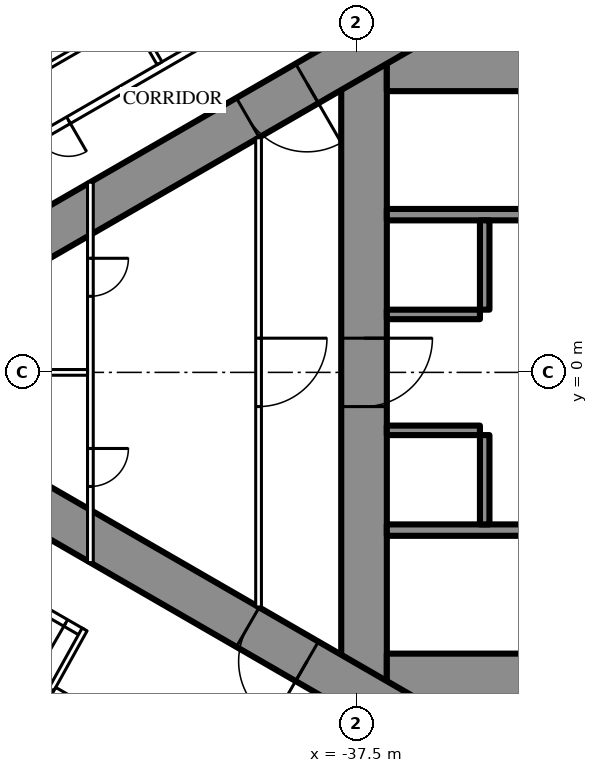
"""IFC4 building model, lengths in metres.
Left out: names, types, materials, properties, quantities, classifications, styles, units other than length and angle.
Written with IfcOpenShell. Run it as: python <this file> out.ifc"""

import sys

from ifc_helpers import new_model, si_unit, direction, frame, frame_2d, origin, place, context, subcontext, project, spatial, rectangle, extrude, element, fill, save


model = new_model("IFC4")
c1 = context("Model", 3, precision=1e-05, world=origin(), true_north=direction((0.0, 1.0)))
c2 = subcontext(c1, "Body", "Model", "MODEL_VIEW")
j1 = project(units=[si_unit("LENGTHUNIT", "METRE"), si_unit("PLANEANGLEUNIT", "RADIAN")], contexts=[c1])
p1 = place(None, origin())
s1 = spatial("IfcSite", under=j1, at=p1, CompositionType="ELEMENT")
p2 = place(p1, origin())
s2 = spatial("IfcBuilding", under=s1, at=p2, CompositionType="ELEMENT")
p3 = place(p2, frame((0.0, 0.0, 244.1)))
s3 = spatial("IfcBuildingStorey", under=s2, at=p3, CompositionType="ELEMENT", Elevation=244.1)
p4 = place(p3, frame((-37.3, 8.6, 0.0), z_axis=(0.0, 0.0, 1.0), x_axis=(0.0, -1.0, 0.0)))
e1 = element("IfcWall", 1, at=p4, inside=s3, PredefinedType="SHEAR", context=c2, shape_type="SweptSolid", body=[
    extrude(rectangle(XDim=17.2, YDim=1.2, at=frame_2d((8.6, 0.0))), origin(), (0.0, 0.0, 1.0), 3.6),
])
p5 = place(p4, frame((7.7, 0.0, 0.0)))
e2 = element("IfcOpeningElement", 2, at=p5, cuts=e1, PredefinedType="OPENING", context=c2, shape_type="SweptSolid", body=[
    extrude(rectangle(XDim=1.8, YDim=2.2, at=frame_2d((0.9, 1.1))), frame((0.0, 0.61, 0.0), z_axis=(0.0, -1.0, 0.0), x_axis=(1.0, 0.0, 0.0)), (0.0, 0.0, 1.0), 1.22),
])
p6 = place(p3, frame((-28.3, 8.0, 0.0), z_axis=(0.0, 0.0, 1.0), x_axis=(-1.0, 0.0, 0.0)))
e3 = element("IfcWall", 3, at=p6, inside=s3, PredefinedType="SHEAR", context=c2, shape_type="SweptSolid", body=[
    extrude(rectangle(XDim=8.4, YDim=1.2, at=frame_2d((4.2, 0.0))), origin(), (0.0, 0.0, 1.0), 3.6),
])
p7 = place(p6, frame((0.25, 0.0, 0.0)))
e4 = element("IfcOpeningElement", 4, at=p7, cuts=e3, PredefinedType="OPENING", context=c2, shape_type="SweptSolid", body=[
    extrude(rectangle(XDim=1.0, YDim=2.2, at=frame_2d((0.5, 1.1))), frame((0.0, 0.61, 0.0), z_axis=(0.0, -1.0, 0.0), x_axis=(1.0, 0.0, 0.0)), (0.0, 0.0, 1.0), 1.22),
])
p8 = place(p3, frame((-28.3, -8.0, 0.0), z_axis=(0.0, 0.0, 1.0), x_axis=(-1.0, 0.0, 0.0)))
e5 = element("IfcWall", 5, at=p8, inside=s3, PredefinedType="SHEAR", context=c2, shape_type="SweptSolid", body=[
    extrude(rectangle(XDim=8.4, YDim=1.2, at=frame_2d((4.2, 0.0))), origin(), (0.0, 0.0, 1.0), 3.6),
])
p9 = place(p8, frame((0.25, 0.0, 0.0)))
e6 = element("IfcOpeningElement", 6, at=p9, cuts=e5, PredefinedType="OPENING", context=c2, shape_type="SweptSolid", body=[
    extrude(rectangle(XDim=1.0, YDim=2.2, at=frame_2d((0.5, 1.1))), frame((0.0, 0.61, 0.0), z_axis=(0.0, -1.0, 0.0), x_axis=(1.0, 0.0, 0.0)), (0.0, 0.0, 1.0), 1.22),
])
for number, where, z_axis, x_axis in (
    (7, (-28.3, 4.15, 0.0), (0.0, 0.0, 1.0), (-1.0, 0.0, 0.0)),
    (8, (-28.3, -4.15, 0.0), (0.0, 0.0, 1.0), (-1.0, 0.0, 0.0)),
):
    element("IfcWall", number, at=place(p3, frame(where, z_axis=z_axis, x_axis=x_axis)), inside=s3, PredefinedType="SHEAR", context=c2, shape_type="SweptSolid", body=[
        extrude(rectangle(XDim=8.4, YDim=0.3, at=frame_2d((4.2, 0.0))), origin(), (0.0, 0.0, 1.0), 3.6),
    ])
p10 = place(p3, frame((-34.125, 4.0, 0.0), z_axis=(0.0, 0.0, 1.0), x_axis=(0.0, -1.0, 0.0)))
e9 = element("IfcWall", 9, at=p10, inside=s3, PredefinedType="SHEAR", context=c2, shape_type="SweptSolid", body=[
    extrude(rectangle(XDim=2.35, YDim=0.25, at=frame_2d((1.175, 0.0))), origin(), (0.0, 0.0, 1.0), 3.6),
])
p11 = place(p3, frame((-34.25, 1.525, 0.0), z_axis=(0.0, 0.0, 1.0), x_axis=(-1.0, 0.0, 0.0)))
e10 = element("IfcWall", 10, at=p11, inside=s3, PredefinedType="SHEAR", context=c2, shape_type="SweptSolid", body=[
    extrude(rectangle(XDim=2.45, YDim=0.25, at=frame_2d((1.225, 0.0))), origin(), (0.0, 0.0, 1.0), 3.6),
])
p12 = place(p3, frame((-34.125, -1.65, 0.0), z_axis=(0.0, 0.0, 1.0), x_axis=(0.0, -1.0, 0.0)))
e11 = element("IfcWall", 11, at=p12, inside=s3, PredefinedType="SHEAR", context=c2, shape_type="SweptSolid", body=[
    extrude(rectangle(XDim=2.35, YDim=0.25, at=frame_2d((1.175, 0.0))), origin(), (0.0, 0.0, 1.0), 3.6),
])
p13 = place(p3, frame((-34.25, -1.525, 0.0), z_axis=(0.0, 0.0, 1.0), x_axis=(-1.0, 0.0, 0.0)))
e12 = element("IfcWall", 12, at=p13, inside=s3, PredefinedType="SHEAR", context=c2, shape_type="SweptSolid", body=[
    extrude(rectangle(XDim=2.45, YDim=0.25, at=frame_2d((1.225, 0.0))), origin(), (0.0, 0.0, 1.0), 3.6),
])
p14 = place(p3, frame((-27.2, 14.3, 0.0), z_axis=(0.0, 0.0, 1.0), x_axis=(-0.866026593062, -0.499997940104, 0.0)))
e13 = element("IfcWall", 13, at=p14, inside=s3, PredefinedType="SHEAR", context=c2, shape_type="SweptSolid", body=[
    extrude(rectangle(XDim=28.946, YDim=1.2, at=frame_2d((14.473, 0.0))), origin(), (0.0, 0.0, 1.0), 3.6),
])
p15 = place(p14, frame((4.6, 0.0, 0.0)))
e14 = element("IfcOpeningElement", 14, at=p15, cuts=e13, PredefinedType="OPENING", context=c2, shape_type="SweptSolid", body=[
    extrude(rectangle(XDim=1.0, YDim=2.2, at=frame_2d((0.5, 1.1))), frame((0.0, 0.61, 0.0), z_axis=(0.0, -1.0, 0.0), x_axis=(1.0, 0.0, 0.0)), (0.0, 0.0, 1.0), 1.22),
])
p16 = place(p14, frame((13.395, 0.0, 0.0)))
e15 = element("IfcOpeningElement", 15, at=p16, cuts=e13, PredefinedType="OPENING", context=c2, shape_type="SweptSolid", body=[
    extrude(rectangle(XDim=1.8, YDim=2.2, at=frame_2d((0.9, 1.1))), frame((0.0, 0.61, 0.0), z_axis=(0.0, -1.0, 0.0), x_axis=(1.0, 0.0, 0.0)), (0.0, 0.0, 1.0), 1.22),
])
p17 = place(p3, frame((-27.2, -14.3, 0.0), z_axis=(0.0, 0.0, 1.0), x_axis=(-0.866024021859, 0.500002393557, 0.0)))
e16 = element("IfcWall", 16, at=p17, inside=s3, PredefinedType="SHEAR", context=c2, shape_type="SweptSolid", body=[
    extrude(rectangle(XDim=27.907, YDim=1.2, at=frame_2d((13.954, 0.0))), origin(), (0.0, 0.0, 1.0), 3.6),
])
p18 = place(p17, frame((4.6, 0.0, 0.0)))
e17 = element("IfcOpeningElement", 17, at=p18, cuts=e16, PredefinedType="OPENING", context=c2, shape_type="SweptSolid", body=[
    extrude(rectangle(XDim=1.0, YDim=2.2, at=frame_2d((0.5, 1.1))), frame((0.0, 0.61, 0.0), z_axis=(0.0, -1.0, 0.0), x_axis=(1.0, 0.0, 0.0)), (0.0, 0.0, 1.0), 1.22),
])
p19 = place(p17, frame((13.395, 0.0, 0.0)))
e18 = element("IfcOpeningElement", 18, at=p19, cuts=e16, PredefinedType="OPENING", context=c2, shape_type="SweptSolid", body=[
    extrude(rectangle(XDim=1.8, YDim=2.2, at=frame_2d((0.9, 1.1))), frame((0.0, 0.61, 0.0), z_axis=(0.0, -1.0, 0.0), x_axis=(1.0, 0.0, 0.0)), (0.0, 0.0, 1.0), 1.22),
])
p20 = place(p3, frame((-28.737, 16.068, 0.0), z_axis=(0.0, 0.0, 1.0), x_axis=(-0.866026057212, -0.499998868229, 0.0)))
e19 = element("IfcWall", 19, at=p20, inside=s3, PredefinedType="PARTITIONING", context=c2, shape_type="SweptSolid", body=[
    extrude(rectangle(XDim=32.137, YDim=0.2, at=frame_2d((16.068, 0.0))), origin(), (0.0, 0.0, 1.0), 3.35),
])
p21 = place(p20, frame((1.08, 0.0, 0.0)))
e20 = element("IfcOpeningElement", 20, at=p21, cuts=e19, PredefinedType="OPENING", context=c2, shape_type="SweptSolid", body=[
    extrude(rectangle(XDim=1.8, YDim=2.04, at=frame_2d((0.9, 1.02))), frame((0.0, 0.11, 0.0), z_axis=(0.0, -1.0, 0.0), x_axis=(1.0, 0.0, 0.0)), (0.0, 0.0, 1.0), 0.22),
])
p22 = place(p20, frame((6.86, 0.0, 0.0)))
e21 = element("IfcOpeningElement", 21, at=p22, cuts=e19, PredefinedType="OPENING", context=c2, shape_type="SweptSolid", body=[
    extrude(rectangle(XDim=1.0, YDim=2.2, at=frame_2d((0.5, 1.1))), frame((0.0, 0.11, 0.0), z_axis=(0.0, -1.0, 0.0), x_axis=(1.0, 0.0, 0.0)), (0.0, 0.0, 1.0), 0.22),
])
p23 = place(p20, frame((18.867, 0.0, 0.0)))
e22 = element("IfcOpeningElement", 22, at=p23, cuts=e19, PredefinedType="OPENING", context=c2, shape_type="SweptSolid", body=[
    extrude(rectangle(XDim=0.95, YDim=2.2, at=frame_2d((0.475, 1.1))), frame((0.0, 0.11, 0.0), z_axis=(0.0, -1.0, 0.0), x_axis=(1.0, 0.0, 0.0)), (0.0, 0.0, 1.0), 0.22),
])
p24 = place(p20, frame((23.015, 0.0, 0.0)))
e23 = element("IfcOpeningElement", 23, at=p24, cuts=e19, PredefinedType="OPENING", context=c2, shape_type="SweptSolid", body=[
    extrude(rectangle(XDim=0.95, YDim=2.2, at=frame_2d((0.475, 1.1))), frame((0.0, 0.11, 0.0), z_axis=(0.0, -1.0, 0.0), x_axis=(1.0, 0.0, 0.0)), (0.0, 0.0, 1.0), 0.22),
])
p25 = place(p20, frame((27.226, 0.0, 0.0)))
e24 = element("IfcOpeningElement", 24, at=p25, cuts=e19, PredefinedType="OPENING", context=c2, shape_type="SweptSolid", body=[
    extrude(rectangle(XDim=1.8, YDim=2.2, at=frame_2d((0.9, 1.1))), frame((0.0, 0.11, 0.0), z_axis=(0.0, -1.0, 0.0), x_axis=(1.0, 0.0, 0.0)), (0.0, 0.0, 1.0), 0.22),
])
p26 = place(p3, frame((-42.68, 8.134, 0.0), z_axis=(0.0, 0.0, 1.0), x_axis=(-0.499984479505, 0.866034364361, 0.0)))
e25 = element("IfcWall", 25, at=p26, inside=s3, PredefinedType="PARTITIONING", context=c2, shape_type="SweptSolid", body=[
    extrude(rectangle(XDim=5.995, YDim=0.15, at=frame_2d((2.998, 0.0))), origin(), (0.0, 0.0, 1.0), 2.45),
])
p27 = place(p3, frame((-44.715, -6.844, 0.0), z_axis=(0.0, 0.0, 1.0), x_axis=(-0.866025261224, 0.500000246922, 0.0)))
e26 = element("IfcWall", 26, at=p27, inside=s3, PredefinedType="PARTITIONING", context=c2, shape_type="SweptSolid", body=[
    extrude(rectangle(XDim=13.567, YDim=0.2, at=frame_2d((6.783, 0.0))), origin(), (0.0, 0.0, 1.0), 3.35),
])
p28 = place(p27, frame((8.716, 0.0, 0.0)))
e27 = element("IfcOpeningElement", 27, at=p28, cuts=e26, PredefinedType="OPENING", context=c2, shape_type="SweptSolid", body=[
    extrude(rectangle(XDim=1.8, YDim=2.2, at=frame_2d((0.9, 1.1))), frame((0.0, 0.11, 0.0), z_axis=(0.0, -1.0, 0.0), x_axis=(1.0, 0.0, 0.0)), (0.0, 0.0, 1.0), 0.22),
])
p29 = place(p27, frame((4.565, 0.0, 0.0)))
e28 = element("IfcOpeningElement", 28, at=p29, cuts=e26, PredefinedType="OPENING", context=c2, shape_type="SweptSolid", body=[
    extrude(rectangle(XDim=0.95, YDim=2.2, at=frame_2d((0.475, 1.1))), frame((0.0, 0.11, 0.0), z_axis=(0.0, -1.0, 0.0), x_axis=(1.0, 0.0, 0.0)), (0.0, 0.0, 1.0), 0.22),
])
p30 = place(p27, frame((0.5, 0.0, 0.0)))
e29 = element("IfcOpeningElement", 29, at=p30, cuts=e26, PredefinedType="OPENING", context=c2, shape_type="SweptSolid", body=[
    extrude(rectangle(XDim=0.967, YDim=2.2, at=frame_2d((0.483, 1.1))), frame((0.0, 0.11, 0.0), z_axis=(0.0, -1.0, 0.0), x_axis=(1.0, 0.0, 0.0)), (0.0, 0.0, 1.0), 0.22),
])
p31 = place(p3, frame((-44.652, -6.764, 0.0), z_axis=(0.0, 0.0, 1.0), x_axis=(-0.485424724123, -0.874278466629, 0.0)))
e30 = element("IfcWall", 30, at=p31, inside=s3, PredefinedType="PARTITIONING", context=c2, shape_type="SweptSolid", body=[
    extrude(rectangle(XDim=1.805, YDim=0.15, at=frame_2d((0.903, 0.0))), origin(), (0.0, 0.0, 1.0), 3.35),
])
p32 = place(p3, frame((-44.765, 8.546, 0.0), z_axis=(0.0, 0.0, 1.0), x_axis=(-0.86604923931, -0.499958713387, 0.0)))
e31 = element("IfcWall", 31, at=p32, inside=s3, PredefinedType="PARTITIONING", context=c2, shape_type="SweptSolid", body=[
    extrude(rectangle(XDim=2.475, YDim=0.15, at=frame_2d((1.237, 0.0))), origin(), (0.0, 0.0, 1.0), 3.35),
])
p33 = place(p3, frame((-40.075, 6.174, 0.0), z_axis=(0.0, 0.0, 1.0), x_axis=(0.0, -1.0, 0.0)))
e32 = element("IfcWall", 32, at=p33, inside=s3, PredefinedType="PARTITIONING", context=c2, shape_type="SweptSolid", body=[
    extrude(rectangle(XDim=12.348, YDim=0.15, at=frame_2d((6.174, 0.0))), origin(), (0.0, 0.0, 1.0), 3.35),
])
p34 = place(p33, frame((5.274, 0.0, 0.0)))
e33 = element("IfcOpeningElement", 33, at=p34, cuts=e32, PredefinedType="OPENING", context=c2, shape_type="SweptSolid", body=[
    extrude(rectangle(XDim=1.8, YDim=2.2, at=frame_2d((0.9, 1.1))), frame((0.0, 0.085, 0.0), z_axis=(0.0, -1.0, 0.0), x_axis=(1.0, 0.0, 0.0)), (0.0, 0.0, 1.0), 0.17),
])
p35 = place(p3, frame((-44.5, 5.005, 0.0), z_axis=(0.0, 0.0, 1.0), x_axis=(0.0, -1.0, 0.0)))
e34 = element("IfcWall", 34, at=p35, inside=s3, PredefinedType="PARTITIONING", context=c2, shape_type="SweptSolid", body=[
    extrude(rectangle(XDim=10.009, YDim=0.15, at=frame_2d((5.005, 0.0))), origin(), (0.0, 0.0, 1.0), 2.5),
])
p36 = place(p35, frame((2.002, 0.0, 0.0)))
e35 = element("IfcOpeningElement", 35, at=p36, cuts=e34, PredefinedType="OPENING", context=c2, shape_type="SweptSolid", body=[
    extrude(rectangle(XDim=1.0, YDim=2.2, at=frame_2d((0.5, 1.1))), frame((0.0, 0.085, 0.0), z_axis=(0.0, -1.0, 0.0), x_axis=(1.0, 0.0, 0.0)), (0.0, 0.0, 1.0), 0.17),
])
p37 = place(p35, frame((7.007, 0.0, 0.0)))
e36 = element("IfcOpeningElement", 36, at=p37, cuts=e34, PredefinedType="OPENING", context=c2, shape_type="SweptSolid", body=[
    extrude(rectangle(XDim=1.0, YDim=2.2, at=frame_2d((0.5, 1.1))), frame((0.0, 0.085, 0.0), z_axis=(0.0, -1.0, 0.0), x_axis=(1.0, 0.0, 0.0)), (0.0, 0.0, 1.0), 0.17),
])
p38 = place(p3, frame((-44.575, 0.0, 0.0), z_axis=(0.0, 0.0, 1.0), x_axis=(-1.0, 0.0, 0.0)))
e37 = element("IfcWall", 37, at=p38, inside=s3, PredefinedType="PARTITIONING", context=c2, shape_type="SweptSolid", body=[
    extrude(rectangle(XDim=8.593, YDim=0.15, at=frame_2d((4.297, 0.0))), origin(), (0.0, 0.0, 1.0), 2.45),
])
p39 = place(p3, frame((-39.758, -11.697, 0.0), z_axis=(0.0, 0.0, 1.0), x_axis=(-0.866024194504, 0.500002094529, 0.0)))
e38 = element("IfcWall", 38, at=p39, inside=s3, PredefinedType="PARTITIONING", context=c2, shape_type="SweptSolid", body=[
    extrude(rectangle(XDim=6.6, YDim=0.25, at=frame_2d((3.3, 0.0))), origin(), (0.0, 0.0, 1.0), 3.35),
])
p40 = place(p39, frame((0.75, 0.0, 0.0)))
e39 = element("IfcOpeningElement", 39, at=p40, cuts=e38, PredefinedType="OPENING", context=c2, shape_type="SweptSolid", body=[
    extrude(rectangle(XDim=1.1, YDim=2.2, at=frame_2d((0.55, 1.1))), frame((0.0, 0.135, 0.0), z_axis=(0.0, -1.0, 0.0), x_axis=(1.0, 0.0, 0.0)), (0.0, 0.0, 1.0), 0.27),
])
p41 = place(p39, frame((2.75, 0.0, 0.0)))
e40 = element("IfcOpeningElement", 40, at=p41, cuts=e38, PredefinedType="OPENING", context=c2, shape_type="SweptSolid", body=[
    extrude(rectangle(XDim=1.1, YDim=2.2, at=frame_2d((0.55, 1.1))), frame((0.0, 0.135, 0.0), z_axis=(0.0, -1.0, 0.0), x_axis=(1.0, 0.0, 0.0)), (0.0, 0.0, 1.0), 0.27),
])
p42 = place(p39, frame((4.75, 0.0, 0.0)))
e41 = element("IfcOpeningElement", 41, at=p42, cuts=e38, PredefinedType="OPENING", context=c2, shape_type="SweptSolid", body=[
    extrude(rectangle(XDim=1.1, YDim=2.2, at=frame_2d((0.55, 1.1))), frame((0.0, 0.135, 0.0), z_axis=(0.0, -1.0, 0.0), x_axis=(1.0, 0.0, 0.0)), (0.0, 0.0, 1.0), 0.27),
])
p43 = place(p23, origin())
e42 = element("IfcDoor", 42, at=p43, inside=s3, OperationType="SINGLE_SWING_LEFT", PredefinedType="DOOR", context=c2, shape_type="SweptSolid", body=[
    extrude(rectangle(XDim=0.95, YDim=2.2, at=frame_2d((0.475, 1.1))), frame((0.0, 0.025, 0.0), z_axis=(0.0, -1.0, 0.0), x_axis=(1.0, 0.0, 0.0)), (0.0, 0.0, 1.0), 0.05),
])
fill(e22, e42)
p44 = place(p30, origin())
e43 = element("IfcDoor", 43, at=p44, inside=s3, OperationType="SINGLE_SWING_LEFT", PredefinedType="DOOR", context=c2, shape_type="SweptSolid", body=[
    extrude(rectangle(XDim=0.967, YDim=2.2, at=frame_2d((0.483, 1.1))), frame((0.0, 0.025, 0.0), z_axis=(0.0, -1.0, 0.0), x_axis=(1.0, 0.0, 0.0)), (0.0, 0.0, 1.0), 0.05),
])
fill(e29, e43)
p45 = place(p34, origin())
e44 = element("IfcDoor", 44, at=p45, inside=s3, OperationType="DOUBLE_DOOR_SINGLE_SWING", PredefinedType="DOOR", context=c2, shape_type="SweptSolid", body=[
    extrude(rectangle(XDim=1.8, YDim=2.2, at=frame_2d((0.9, 1.1))), frame((0.0, 0.025, 0.0), z_axis=(0.0, -1.0, 0.0), x_axis=(1.0, 0.0, 0.0)), (0.0, 0.0, 1.0), 0.05),
])
fill(e33, e44)
p46 = place(p36, origin())
e45 = element("IfcDoor", 45, at=p46, inside=s3, OperationType="SINGLE_SWING_LEFT", PredefinedType="DOOR", context=c2, shape_type="SweptSolid", body=[
    extrude(rectangle(XDim=1.0, YDim=2.2, at=frame_2d((0.5, 1.1))), frame((0.0, 0.025, 0.0), z_axis=(0.0, -1.0, 0.0), x_axis=(1.0, 0.0, 0.0)), (0.0, 0.0, 1.0), 0.05),
])
fill(e35, e45)
p47 = place(p37, origin())
e46 = element("IfcDoor", 46, at=p47, inside=s3, OperationType="SINGLE_SWING_LEFT", PredefinedType="DOOR", context=c2, shape_type="SweptSolid", body=[
    extrude(rectangle(XDim=1.0, YDim=2.2, at=frame_2d((0.5, 1.1))), frame((0.0, 0.025, 0.0), z_axis=(0.0, -1.0, 0.0), x_axis=(1.0, 0.0, 0.0)), (0.0, 0.0, 1.0), 0.05),
])
fill(e36, e46)
p48 = place(p16, origin())
e47 = element("IfcDoor", 47, at=p48, inside=s3, OperationType="DOUBLE_DOOR_SINGLE_SWING", PredefinedType="DOOR", context=c2, shape_type="SweptSolid", body=[
    extrude(rectangle(XDim=1.8, YDim=2.2, at=frame_2d((0.9, 1.1))), frame((0.0, 0.025, 0.0), z_axis=(0.0, -1.0, 0.0), x_axis=(1.0, 0.0, 0.0)), (0.0, 0.0, 1.0), 0.05),
])
fill(e15, e47)
p49 = place(p19, origin())
e48 = element("IfcDoor", 48, at=p49, inside=s3, OperationType="DOUBLE_DOOR_SINGLE_SWING", PredefinedType="DOOR", context=c2, shape_type="SweptSolid", body=[
    extrude(rectangle(XDim=1.8, YDim=2.2, at=frame_2d((0.9, 1.1))), frame((0.0, 0.025, 0.0), z_axis=(0.0, -1.0, 0.0), x_axis=(1.0, 0.0, 0.0)), (0.0, 0.0, 1.0), 0.05),
])
fill(e18, e48)
p50 = place(p5, origin())
e49 = element("IfcDoor", 49, at=p50, inside=s3, OperationType="DOUBLE_DOOR_SINGLE_SWING", PredefinedType="DOOR", context=c2, shape_type="SweptSolid", body=[
    extrude(rectangle(XDim=1.8, YDim=2.2, at=frame_2d((0.9, 1.1))), frame((0.0, 0.025, 0.0), z_axis=(0.0, -1.0, 0.0), x_axis=(1.0, 0.0, 0.0)), (0.0, 0.0, 1.0), 0.05),
])
fill(e2, e49)
save(model, sys.argv[1])
